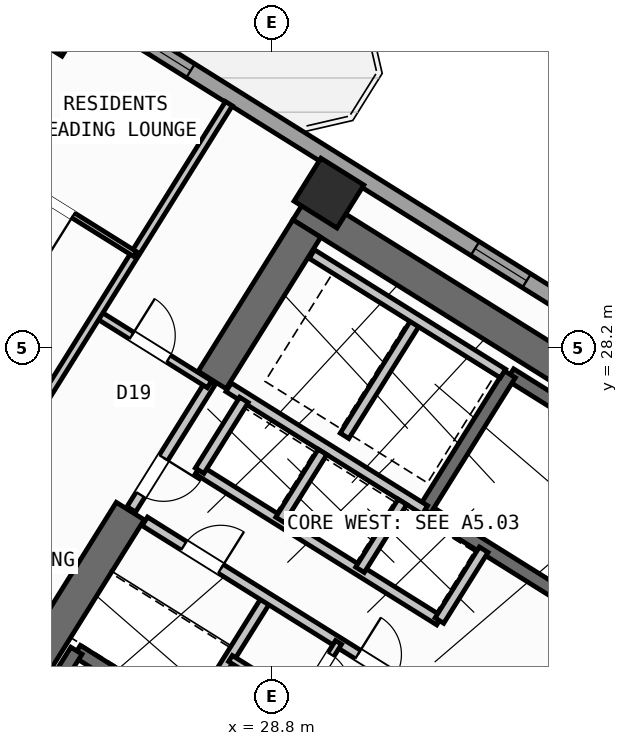
"""IFC4 building model, lengths in metres.
Left out: names, types, materials, properties, quantities, classifications, styles, units other than length and angle.
Written with IfcOpenShell. Run it as: python <this file> out.ifc"""

import sys

from ifc_helpers import new_model, si_unit, direction, frame, frame_2d, origin, origin_2d, place, context, subcontext, project, spatial, rectangle, hollow_rectangle, extrude, source, transform, mapped, element, fill, save


model = new_model("IFC4")
c1 = context("Model", 3, precision=1e-05, world=origin(), true_north=direction((0.0, 1.0)))
c2 = subcontext(c1, "Body", "Model", "MODEL_VIEW")
j1 = project(units=[si_unit("LENGTHUNIT", "METRE"), si_unit("PLANEANGLEUNIT", "RADIAN")], contexts=[c1])
p1 = place(None, origin())
s1 = spatial("IfcSite", under=j1, at=p1, CompositionType="ELEMENT")
p2 = place(p1, origin())
s2 = spatial("IfcBuilding", under=s1, at=p2, CompositionType="ELEMENT")
p3 = place(p2, frame((0.0, 0.0, 52.8)))
s3 = spatial("IfcBuildingStorey", under=s2, at=p3, CompositionType="ELEMENT", Elevation=52.8)
p4 = place(p3, frame((40.615, 23.983, 0.0), z_axis=(0.0, 0.0, 1.0), x_axis=(-0.848045953968, 0.529922692436, 0.0)))
e1 = element("IfcWall", 1, at=p4, inside=s3, PredefinedType="SHEAR", context=c2, shape_type="SweptSolid", body=[
    extrude(rectangle(XDim=13.24, YDim=0.65, at=frame_2d((6.62, 0.0))), origin(), (0.0, 0.0, 1.0), 3.35),
])
p5 = place(p3, frame((29.491, 30.552, 0.0), z_axis=(0.0, 0.0, 1.0), x_axis=(-0.529893103397, -0.8480644427, 0.0)))
e2 = element("IfcWall", 2, at=p5, inside=s3, PredefinedType="SHEAR", context=c2, shape_type="SweptSolid", body=[
    extrude(rectangle(XDim=3.525, YDim=0.65, at=frame_2d((1.763, 0.0))), origin(), (0.0, 0.0, 1.0), 3.35),
])
p6 = place(p3, frame((26.007, 24.976, 0.0), z_axis=(0.0, 0.0, 1.0), x_axis=(-0.529916319127, -0.848049936456, 0.0)))
e3 = element("IfcWall", 3, at=p6, inside=s3, PredefinedType="SHEAR", context=c2, shape_type="SweptSolid", body=[
    extrude(rectangle(XDim=6.375, YDim=0.65, at=frame_2d((3.188, 0.0))), origin(), (0.0, 0.0, 1.0), 3.35),
])
m1 = source(origin(), c2, "Body", "SweptSolid", [
    extrude(hollow_rectangle(XDim=1.0, YDim=1.0, WallThickness=0.04, at=origin_2d()), origin(), (0.0, 0.0, 1.0), 3.6),
])
for number, where, z_axis, x_axis in (
    (4, (29.928, 31.251, 0.0), (0.0, 0.0, 1.0), (-0.848, 0.53, 0.0)),
    (5, (24.5, 34.643, 0.0), (0.0, 0.0, 1.0), (-0.848, 0.53, 0.0)),
):
    element("IfcColumn", number, at=place(p3, frame(where, z_axis=z_axis, x_axis=x_axis)), inside=s3, PredefinedType="COLUMN", context=c2, shape_type="MappedRepresentation", body=[
        mapped(m1, transform((0.0, 0.0, 0.0), scale=1.0)),
    ])
p7 = place(p3, frame((29.268, 6.429, 0.0), z_axis=(0.0, 0.0, 1.0), x_axis=(-0.848049971435, 0.529916263149, 0.0)))
e6 = element("IfcWall", 6, at=p7, inside=s3, PredefinedType="STANDARD", context=c2, shape_type="SweptSolid", body=[
    extrude(rectangle(XDim=31.588, YDim=0.32, at=frame_2d((15.794, 0.0))), origin(), (0.0, 0.0, 1.0), 3.35),
])
p8 = place(p7, frame((16.362, 0.0, 0.0)))
e7 = element("IfcOpeningElement", 7, at=p8, cuts=e6, PredefinedType="OPENING", context=c2, shape_type="SweptSolid", body=[
    extrude(rectangle(XDim=1.2, YDim=2.15, at=frame_2d((0.6, 1.075))), frame((0.0, 0.17, 0.0), z_axis=(0.0, -1.0, 0.0), x_axis=(1.0, 0.0, 0.0)), (0.0, 0.0, 1.0), 0.34),
])
p9 = place(p7, frame((2.989, 0.0, 0.8)))
e8 = element("IfcOpeningElement", 8, at=p9, cuts=e6, PredefinedType="OPENING", context=c2, shape_type="SweptSolid", body=[
    extrude(rectangle(XDim=2.1, YDim=1.55, at=frame_2d((1.05, 0.775))), frame((0.0, 0.17, 0.0), z_axis=(0.0, -1.0, 0.0), x_axis=(1.0, 0.0, 0.0)), (0.0, 0.0, 1.0), 0.34),
])
p10 = place(p7, frame((8.359, 0.0, 0.8)))
e9 = element("IfcOpeningElement", 9, at=p10, cuts=e6, PredefinedType="OPENING", context=c2, shape_type="SweptSolid", body=[
    extrude(rectangle(XDim=2.1, YDim=1.55, at=frame_2d((1.05, 0.775))), frame((0.0, 0.17, 0.0), z_axis=(0.0, -1.0, 0.0), x_axis=(1.0, 0.0, 0.0)), (0.0, 0.0, 1.0), 0.34),
])
p11 = place(p7, frame((13.284, 0.0, 0.95)))
e10 = element("IfcOpeningElement", 10, at=p11, cuts=e6, PredefinedType="OPENING", context=c2, shape_type="SweptSolid", body=[
    extrude(rectangle(XDim=1.2, YDim=1.4, at=frame_2d((0.6, 0.7))), frame((0.0, 0.17, 0.0), z_axis=(0.0, -1.0, 0.0), x_axis=(1.0, 0.0, 0.0)), (0.0, 0.0, 1.0), 0.34),
])
p12 = place(p7, frame((20.259, 0.0, 0.95)))
e11 = element("IfcOpeningElement", 11, at=p12, cuts=e6, PredefinedType="OPENING", context=c2, shape_type="SweptSolid", body=[
    extrude(rectangle(XDim=1.2, YDim=1.4, at=frame_2d((0.6, 0.7))), frame((0.0, 0.17, 0.0), z_axis=(0.0, -1.0, 0.0), x_axis=(1.0, 0.0, 0.0)), (0.0, 0.0, 1.0), 0.34),
])
p13 = place(p7, frame((22.929, 0.0, 0.95)))
e12 = element("IfcOpeningElement", 12, at=p13, cuts=e6, PredefinedType="OPENING", context=c2, shape_type="SweptSolid", body=[
    extrude(rectangle(XDim=1.2, YDim=1.4, at=frame_2d((0.6, 0.7))), frame((0.0, 0.17, 0.0), z_axis=(0.0, -1.0, 0.0), x_axis=(1.0, 0.0, 0.0)), (0.0, 0.0, 1.0), 0.34),
])
p14 = place(p7, frame((26.106, 0.0, 0.85)))
e13 = element("IfcOpeningElement", 13, at=p14, cuts=e6, PredefinedType="OPENING", context=c2, shape_type="SweptSolid", body=[
    extrude(rectangle(XDim=1.5, YDim=1.5, at=frame_2d((0.75, 0.75))), frame((0.0, 0.17, 0.0), z_axis=(0.0, -1.0, 0.0), x_axis=(1.0, 0.0, 0.0)), (0.0, 0.0, 1.0), 0.34),
])
p15 = place(p7, frame((29.068, 0.0, 0.85)))
e14 = element("IfcOpeningElement", 14, at=p15, cuts=e6, PredefinedType="OPENING", context=c2, shape_type="SweptSolid", body=[
    extrude(rectangle(XDim=1.8, YDim=1.5, at=frame_2d((0.9, 0.75))), frame((0.0, 0.17, 0.0), z_axis=(0.0, -1.0, 0.0), x_axis=(1.0, 0.0, 0.0)), (0.0, 0.0, 1.0), 0.34),
])
p16 = place(p3, frame((14.138, 41.825, 0.0), z_axis=(0.0, 0.0, 1.0), x_axis=(0.848046498049, -0.529921821731, 0.0)))
e15 = element("IfcWall", 15, at=p16, inside=s3, PredefinedType="STANDARD", context=c2, shape_type="SweptSolid", body=[
    extrude(rectangle(XDim=31.588, YDim=0.32, at=frame_2d((15.794, 0.0))), origin(), (0.0, 0.0, 1.0), 3.35),
])
p17 = place(p16, frame((3.159, 0.0, 0.0)))
e16 = element("IfcOpeningElement", 16, at=p17, cuts=e15, PredefinedType="OPENING", context=c2, shape_type="SweptSolid", body=[
    extrude(rectangle(XDim=1.05, YDim=2.15, at=frame_2d((0.525, 1.075))), frame((0.0, 0.17, 0.0), z_axis=(0.0, -1.0, 0.0), x_axis=(1.0, 0.0, 0.0)), (0.0, 0.0, 1.0), 0.34),
])
p18 = place(p16, frame((0.906, 0.0, 1.0)))
e17 = element("IfcOpeningElement", 17, at=p18, cuts=e15, PredefinedType="OPENING", context=c2, shape_type="SweptSolid", body=[
    extrude(rectangle(XDim=0.9, YDim=1.25, at=frame_2d((0.45, 0.625))), frame((0.0, 0.17, 0.0), z_axis=(0.0, -1.0, 0.0), x_axis=(1.0, 0.0, 0.0)), (0.0, 0.0, 1.0), 0.34),
])
p19 = place(p16, frame((9.537, 0.0, 0.85)))
e18 = element("IfcOpeningElement", 18, at=p19, cuts=e15, PredefinedType="OPENING", context=c2, shape_type="SweptSolid", body=[
    extrude(rectangle(XDim=1.8, YDim=1.5, at=frame_2d((0.9, 0.75))), frame((0.0, 0.17, 0.0), z_axis=(0.0, -1.0, 0.0), x_axis=(1.0, 0.0, 0.0)), (0.0, 0.0, 1.0), 0.34),
])
p20 = place(p16, frame((13.899, 0.0, 0.85)))
e19 = element("IfcOpeningElement", 19, at=p20, cuts=e15, PredefinedType="OPENING", context=c2, shape_type="SweptSolid", body=[
    extrude(rectangle(XDim=1.5, YDim=1.5, at=frame_2d((0.75, 0.75))), frame((0.0, 0.17, 0.0), z_axis=(0.0, -1.0, 0.0), x_axis=(1.0, 0.0, 0.0)), (0.0, 0.0, 1.0), 0.34),
])
p21 = place(p16, frame((22.019, 0.0, 0.95)))
e20 = element("IfcOpeningElement", 20, at=p21, cuts=e15, PredefinedType="OPENING", context=c2, shape_type="SweptSolid", body=[
    extrude(rectangle(XDim=1.2, YDim=1.4, at=frame_2d((0.6, 0.7))), frame((0.0, 0.17, 0.0), z_axis=(0.0, -1.0, 0.0), x_axis=(1.0, 0.0, 0.0)), (0.0, 0.0, 1.0), 0.34),
])
p22 = place(p16, frame((27.569, 0.0, 0.95)))
e21 = element("IfcOpeningElement", 21, at=p22, cuts=e15, PredefinedType="OPENING", context=c2, shape_type="SweptSolid", body=[
    extrude(rectangle(XDim=1.2, YDim=1.4, at=frame_2d((0.6, 0.7))), frame((0.0, 0.17, 0.0), z_axis=(0.0, -1.0, 0.0), x_axis=(1.0, 0.0, 0.0)), (0.0, 0.0, 1.0), 0.34),
])
p23 = place(p3, frame((31.28, 18.261, 0.0), z_axis=(0.0, 0.0, 1.0), x_axis=(-0.848051618787, 0.529913626805, 0.0)))
e22 = element("IfcWall", 22, at=p23, inside=s3, PredefinedType="SHEAR", context=c2, shape_type="SweptSolid", body=[
    extrude(rectangle(XDim=7.46, YDim=0.26, at=frame_2d((3.73, 0.0))), origin(), (0.0, 0.0, 1.0), 3.35),
])
p24 = place(p23, frame((0.36, 0.0, 0.0)))
e23 = element("IfcOpeningElement", 23, at=p24, cuts=e22, PredefinedType="OPENING", context=c2, shape_type="SweptSolid", body=[
    extrude(rectangle(XDim=0.86, YDim=2.05, at=frame_2d((0.43, 1.025))), frame((0.0, 0.14, 0.0), z_axis=(0.0, -1.0, 0.0), x_axis=(1.0, 0.0, 0.0)), (0.0, 0.0, 1.0), 0.28),
])
p25 = place(p3, frame((24.945, 22.22, 0.0), z_axis=(0.0, 0.0, 1.0), x_axis=(-0.529908658664, -0.84805472316, 0.0)))
e24 = element("IfcWall", 24, at=p25, inside=s3, PredefinedType="SHEAR", context=c2, shape_type="SweptSolid", body=[
    extrude(rectangle(XDim=3.16, YDim=0.26, at=frame_2d((1.58, 0.0))), origin(), (0.0, 0.0, 1.0), 3.35),
])
p26 = place(p3, frame((39.721, 23.788, 0.0), z_axis=(0.0, 0.0, 1.0), x_axis=(-0.848054434086, 0.529909121291, 0.0)))
e25 = element("IfcWall", 25, at=p26, inside=s3, PredefinedType="SHEAR", context=c2, shape_type="SweptSolid", body=[
    extrude(rectangle(XDim=7.33, YDim=0.26, at=frame_2d((3.665, 0.0))), origin(), (0.0, 0.0, 1.0), 3.35),
])
p27 = place(p3, frame((38.046, 21.108, 0.0), z_axis=(0.0, 0.0, 1.0), x_axis=(-0.848054434086, 0.529909121291, 0.0)))
e26 = element("IfcWall", 26, at=p27, inside=s3, PredefinedType="SHEAR", context=c2, shape_type="SweptSolid", body=[
    extrude(rectangle(XDim=7.33, YDim=0.26, at=frame_2d((3.665, 0.0))), origin(), (0.0, 0.0, 1.0), 3.35),
])
p28 = place(p27, frame((0.22, 0.0, 0.0)))
e27 = element("IfcOpeningElement", 27, at=p28, cuts=e26, PredefinedType="OPENING", context=c2, shape_type="SweptSolid", body=[
    extrude(rectangle(XDim=1.1, YDim=2.1, at=frame_2d((0.55, 1.05))), frame((0.0, 0.14, 0.0), z_axis=(0.0, -1.0, 0.0), x_axis=(1.0, 0.0, 0.0)), (0.0, 0.0, 1.0), 0.28),
])
p29 = place(p3, frame((33.496, 27.677, 0.0), z_axis=(0.0, 0.0, 1.0), x_axis=(-0.529908658664, -0.84805472316, 0.0)))
e28 = element("IfcWall", 28, at=p29, inside=s3, PredefinedType="SHEAR", context=c2, shape_type="SweptSolid", body=[
    extrude(rectangle(XDim=3.16, YDim=0.26, at=frame_2d((1.58, 0.0))), origin(), (0.0, 0.0, 1.0), 3.35),
])
p30 = place(p3, frame((31.822, 24.998, 0.0), z_axis=(0.0, 0.0, 1.0), x_axis=(-0.848058348634, 0.529902856485, 0.0)))
e29 = element("IfcWall", 29, at=p30, inside=s3, PredefinedType="STANDARD", context=c2, shape_type="SweptSolid", body=[
    extrude(rectangle(XDim=4.568, YDim=0.2, at=frame_2d((2.284, 0.0))), origin(), (0.0, 0.0, 1.0), 3.34),
])
p31 = place(p3, frame((32.108, 22.814, 0.0), z_axis=(0.0, 0.0, 1.0), x_axis=(-0.848042229521, 0.529928652696, 0.0)))
e30 = element("IfcWall", 30, at=p31, inside=s3, PredefinedType="STANDARD", context=c2, shape_type="SweptSolid", body=[
    extrude(rectangle(XDim=5.62, YDim=0.2, at=frame_2d((2.81, 0.0))), origin(), (0.0, 0.0, 1.0), 3.34),
])
p32 = place(p3, frame((32.982, 24.213, 0.0), z_axis=(0.0, 0.0, 1.0), x_axis=(-0.529839334948, -0.84809803628, 0.0)))
e31 = element("IfcWall", 31, at=p32, inside=s3, PredefinedType="STANDARD", context=c2, shape_type="SweptSolid", body=[
    extrude(rectangle(XDim=1.65, YDim=0.2, at=frame_2d((0.825, 0.0))), origin(), (0.0, 0.0, 1.0), 3.34),
])
p33 = place(p3, frame((28.25, 27.17, 0.0), z_axis=(0.0, 0.0, 1.0), x_axis=(-0.529905827651, -0.848056492117, 0.0)))
e32 = element("IfcWall", 32, at=p33, inside=s3, PredefinedType="STANDARD", context=c2, shape_type="SweptSolid", body=[
    extrude(rectangle(XDim=1.65, YDim=0.2, at=frame_2d((0.825, 0.0))), origin(), (0.0, 0.0, 1.0), 3.34),
])
p34 = place(p3, frame((31.645, 28.716, 0.0), z_axis=(0.0, 0.0, 1.0), x_axis=(-0.52986693015, -0.848080795876, 0.0)))
e33 = element("IfcWall", 33, at=p34, inside=s3, PredefinedType="STANDARD", context=c2, shape_type="SweptSolid", body=[
    extrude(rectangle(XDim=2.66, YDim=0.2, at=frame_2d((1.33, 0.0))), origin(), (0.0, 0.0, 1.0), 3.34),
])
p35 = place(p3, frame((33.363, 27.69, 0.0), z_axis=(0.0, 0.0, 1.0), x_axis=(-0.848053806312, 0.529910125964, 0.0)))
e34 = element("IfcWall", 34, at=p35, inside=s3, PredefinedType="STANDARD", context=c2, shape_type="SweptSolid", body=[
    extrude(rectangle(XDim=4.448, YDim=0.2, at=frame_2d((2.224, 0.0))), origin(), (0.0, 0.0, 1.0), 3.34),
])
for number, where, z_axis, x_axis in (
    (35, (31.379, 25.156, 0.0), (0.0, 0.0, 1.0), (-0.53, -0.848, 0.0)),
    (36, (29.801, 26.142, 0.0), (0.0, 0.0, 1.0), (-0.53, -0.848, 0.0)),
):
    element("IfcWall", number, at=place(p3, frame(where, z_axis=z_axis, x_axis=x_axis)), inside=s3, PredefinedType="STANDARD", context=c2, shape_type="SweptSolid", body=[
        extrude(rectangle(XDim=1.58, YDim=0.2, at=frame_2d((0.79, 0.0))), origin(), (0.0, 0.0, 1.0), 3.34),
    ])
p36 = place(p3, frame((28.71, 23.263, 0.0), z_axis=(0.0, 0.0, 1.0), x_axis=(-0.529907497854, -0.848055448493, 0.0)))
e37 = element("IfcWall", 37, at=p36, inside=s3, PredefinedType="STANDARD", context=c2, shape_type="SweptSolid", body=[
    extrude(rectangle(XDim=2.88, YDim=0.2, at=frame_2d((1.44, 0.0))), origin(), (0.0, 0.0, 1.0), 3.34),
])
p37 = place(p3, frame((31.525, 21.504, 0.0), z_axis=(0.0, 0.0, 1.0), x_axis=(-0.848044998614, 0.529924221305, 0.0)))
e38 = element("IfcWall", 38, at=p37, inside=s3, PredefinedType="STANDARD", context=c2, shape_type="SweptSolid", body=[
    extrude(rectangle(XDim=6.168, YDim=0.2, at=frame_2d((3.084, 0.0))), origin(), (0.0, 0.0, 1.0), 3.34),
])
p38 = place(p37, frame((4.4, 0.0, 0.0)))
e39 = element("IfcOpeningElement", 39, at=p38, cuts=e38, PredefinedType="OPENING", context=c2, shape_type="SweptSolid", body=[
    extrude(rectangle(XDim=0.86, YDim=2.05, at=frame_2d((0.43, 1.025))), frame((0.0, 0.11, 0.0), z_axis=(0.0, -1.0, 0.0), x_axis=(1.0, 0.0, 0.0)), (0.0, 0.0, 1.0), 0.22),
])
p39 = place(p37, frame((0.35, 0.0, 0.0)))
e40 = element("IfcOpeningElement", 40, at=p39, cuts=e38, PredefinedType="OPENING", context=c2, shape_type="SweptSolid", body=[
    extrude(rectangle(XDim=0.86, YDim=2.05, at=frame_2d((0.43, 1.025))), frame((0.0, 0.11, 0.0), z_axis=(0.0, -1.0, 0.0), x_axis=(1.0, 0.0, 0.0)), (0.0, 0.0, 1.0), 0.22),
])
p40 = place(p3, frame((30.117, 22.384, 0.0), z_axis=(0.0, 0.0, 1.0), x_axis=(-0.529951914384, -0.848027693204, 0.0)))
e41 = element("IfcWall", 41, at=p40, inside=s3, PredefinedType="PLUMBINGWALL", context=c2, shape_type="SweptSolid", body=[
    extrude(rectangle(XDim=1.4, YDim=0.14, at=frame_2d((0.7, 0.0))), origin(), (0.0, 0.0, 1.0), 3.34),
])
p41 = place(p40, frame((0.28, 0.0, 0.0)))
e42 = element("IfcOpeningElement", 42, at=p41, cuts=e41, PredefinedType="OPENING", context=c2, shape_type="SweptSolid", body=[
    extrude(rectangle(XDim=0.78, YDim=2.05, at=frame_2d((0.39, 1.025))), frame((0.0, 0.08, 0.0), z_axis=(0.0, -1.0, 0.0), x_axis=(1.0, 0.0, 0.0)), (0.0, 0.0, 1.0), 0.16),
])
p42 = place(p3, frame((30.766, 20.327, 0.0), z_axis=(0.0, 0.0, 1.0), x_axis=(-0.848052663127, 0.529911955482, 0.0)))
e43 = element("IfcWall", 43, at=p42, inside=s3, PredefinedType="PLUMBINGWALL", context=c2, shape_type="SweptSolid", body=[
    extrude(rectangle(XDim=3.28, YDim=0.14, at=frame_2d((1.64, 0.0))), origin(), (0.0, 0.0, 1.0), 3.34),
])
p43 = place(p42, frame((0.25, 0.0, 0.0)))
e44 = element("IfcOpeningElement", 44, at=p43, cuts=e43, PredefinedType="OPENING", context=c2, shape_type="SweptSolid", body=[
    extrude(rectangle(XDim=0.78, YDim=2.05, at=frame_2d((0.39, 1.025))), frame((0.0, 0.08, 0.0), z_axis=(0.0, -1.0, 0.0), x_axis=(1.0, 0.0, 0.0)), (0.0, 0.0, 1.0), 0.16),
])
p44 = place(p42, frame((1.92, 0.0, 0.0)))
e45 = element("IfcOpeningElement", 45, at=p44, cuts=e43, PredefinedType="OPENING", context=c2, shape_type="SweptSolid", body=[
    extrude(rectangle(XDim=0.78, YDim=2.05, at=frame_2d((0.39, 1.025))), frame((0.0, 0.08, 0.0), z_axis=(0.0, -1.0, 0.0), x_axis=(1.0, 0.0, 0.0)), (0.0, 0.0, 1.0), 0.16),
])
p45 = place(p3, frame((27.596, 27.52, 0.0), z_axis=(0.0, 0.0, 1.0), x_axis=(-0.529865479138, -0.848081702443, 0.0)))
e46 = element("IfcWall", 46, at=p45, inside=s3, PredefinedType="STANDARD", context=c2, shape_type="SweptSolid", body=[
    extrude(rectangle(XDim=2.96, YDim=0.2, at=frame_2d((1.48, 0.0))), origin(), (0.0, 0.0, 1.0), 3.34),
])
p46 = place(p45, frame((1.76, 0.0, 0.0)))
e47 = element("IfcOpeningElement", 47, at=p46, cuts=e46, PredefinedType="OPENING", context=c2, shape_type="SweptSolid", body=[
    extrude(rectangle(XDim=0.86, YDim=2.05, at=frame_2d((0.43, 1.025))), frame((0.0, 0.11, 0.0), z_axis=(0.0, -1.0, 0.0), x_axis=(1.0, 0.0, 0.0)), (0.0, 0.0, 1.0), 0.22),
])
p47 = place(p3, frame((27.57, 27.478, 0.0), z_axis=(0.0, 0.0, 1.0), x_axis=(-0.848050851465, 0.529914854792, 0.0)))
e48 = element("IfcWall", 48, at=p47, inside=s3, PredefinedType="PARTITIONING", context=c2, shape_type="SweptSolid", body=[
    extrude(rectangle(XDim=2.61, YDim=0.16, at=frame_2d((1.305, 0.0))), origin(), (0.0, 0.0, 1.0), 3.34),
])
p48 = place(p47, frame((0.95, 0.0, 0.0)))
e49 = element("IfcOpeningElement", 49, at=p48, cuts=e48, PredefinedType="OPENING", context=c2, shape_type="SweptSolid", body=[
    extrude(rectangle(XDim=0.86, YDim=2.05, at=frame_2d((0.43, 1.025))), frame((0.0, 0.09, 0.0), z_axis=(0.0, -1.0, 0.0), x_axis=(1.0, 0.0, 0.0)), (0.0, 0.0, 1.0), 0.18),
])
p49 = place(p3, frame((27.953, 33.016, 0.0), z_axis=(0.0, 0.0, 1.0), x_axis=(-0.529903001606, -0.848058257957, 0.0)))
e50 = element("IfcWall", 50, at=p49, inside=s3, PredefinedType="PARTITIONING", context=c2, shape_type="SweptSolid", body=[
    extrude(rectangle(XDim=9.15, YDim=0.16, at=frame_2d((4.575, 0.0))), origin(), (0.0, 0.0, 1.0), 3.34),
])
p50 = place(p3, frame((26.099, 30.05, 0.0), z_axis=(0.0, 0.0, 1.0), x_axis=(-0.84803087207, 0.529946827537, 0.0)))
e51 = element("IfcWall", 51, at=p50, inside=s3, PredefinedType="PARTITIONING", context=c2, shape_type="SweptSolid", body=[
    extrude(rectangle(XDim=3.79, YDim=0.11, at=frame_2d((1.895, 0.0))), origin(), (0.0, 0.0, 1.0), 3.34),
])
p51 = place(p50, frame((1.435, 0.0, 0.0)))
e52 = element("IfcOpeningElement", 52, at=p51, cuts=e51, PredefinedType="OPENING", context=c2, shape_type="SweptSolid", body=[
    extrude(rectangle(XDim=0.92, YDim=2.08, at=frame_2d((0.46, 1.04))), frame((0.0, 0.065, 0.0), z_axis=(0.0, -1.0, 0.0), x_axis=(1.0, 0.0, 0.0)), (0.0, 0.0, 1.0), 0.13),
])
m2 = source(origin(), c2, "Body", "SweptSolid", [
    extrude(rectangle(XDim=1.5, YDim=1.5, at=frame_2d((0.75, 0.75))), frame((0.0, 0.03, 0.0), z_axis=(0.0, -1.0, 0.0), x_axis=(1.0, 0.0, 0.0)), (0.0, 0.0, 1.0), 0.06),
])
p52 = place(p20, origin())
e53 = element("IfcWindow", 53, at=p52, inside=s3, PartitioningType="SINGLE_PANEL", PredefinedType="WINDOW", context=c2, shape_type="MappedRepresentation", body=[
    mapped(m2, transform((0.0, 0.0, 0.0), scale=1.0)),
])
fill(e19, e53)
m3 = source(origin(), c2, "Body", "SweptSolid", [
    extrude(rectangle(XDim=1.2, YDim=1.4, at=frame_2d((0.6, 0.7))), frame((0.0, 0.03, 0.0), z_axis=(0.0, -1.0, 0.0), x_axis=(1.0, 0.0, 0.0)), (0.0, 0.0, 1.0), 0.06),
])
p53 = place(p21, origin())
e54 = element("IfcWindow", 54, at=p53, inside=s3, PartitioningType="SINGLE_PANEL", PredefinedType="WINDOW", context=c2, shape_type="MappedRepresentation", body=[
    mapped(m3, transform((0.0, 0.0, 0.0), scale=1.0)),
])
fill(e20, e54)
m4 = source(origin(), c2, "Body", "SweptSolid", [
    extrude(rectangle(XDim=0.86, YDim=2.05, at=frame_2d((0.43, 1.025))), frame((0.0, 0.025, 0.0), z_axis=(0.0, -1.0, 0.0), x_axis=(1.0, 0.0, 0.0)), (0.0, 0.0, 1.0), 0.05),
])
p54 = place(p38, frame((0.86, 0.0, 0.0), z_axis=(0.0, 0.0, 1.0), x_axis=(-1.0, 0.0, 0.0)))
e55 = element("IfcDoor", 55, at=p54, inside=s3, OperationType="SINGLE_SWING_RIGHT", PredefinedType="DOOR", context=c2, shape_type="MappedRepresentation", body=[
    mapped(m4, transform((0.0, 0.0, 0.0), scale=1.0)),
])
fill(e39, e55)
p55 = place(p39, frame((0.86, 0.0, 0.0), z_axis=(0.0, 0.0, 1.0), x_axis=(-1.0, 0.0, 0.0)))
e56 = element("IfcDoor", 56, at=p55, inside=s3, OperationType="SINGLE_SWING_LEFT", PredefinedType="DOOR", context=c2, shape_type="MappedRepresentation", body=[
    mapped(m4, transform((0.0, 0.0, 0.0), scale=1.0)),
])
fill(e40, e56)
m5 = source(origin(), c2, "Body", "SweptSolid", [
    extrude(rectangle(XDim=0.78, YDim=2.05, at=frame_2d((0.39, 1.025))), frame((0.0, 0.025, 0.0), z_axis=(0.0, -1.0, 0.0), x_axis=(1.0, 0.0, 0.0)), (0.0, 0.0, 1.0), 0.05),
])
p56 = place(p41, origin())
e57 = element("IfcDoor", 57, at=p56, inside=s3, OperationType="SINGLE_SWING_RIGHT", PredefinedType="DOOR", context=c2, shape_type="MappedRepresentation", body=[
    mapped(m5, transform((0.0, 0.0, 0.0), scale=1.0)),
])
fill(e42, e57)
p57 = place(p48, frame((0.86, 0.0, 0.0), z_axis=(0.0, 0.0, 1.0), x_axis=(-1.0, 0.0, 0.0)))
e58 = element("IfcDoor", 58, at=p57, inside=s3, OperationType="SINGLE_SWING_LEFT", PredefinedType="DOOR", context=c2, shape_type="MappedRepresentation", body=[
    mapped(m4, transform((0.0, 0.0, 0.0), scale=1.0)),
])
fill(e49, e58)
p58 = place(p46, origin())
e59 = element("IfcDoor", 59, at=p58, inside=s3, OperationType="SINGLE_SWING_LEFT", PredefinedType="DOOR", context=c2, shape_type="MappedRepresentation", body=[
    mapped(m4, transform((0.0, 0.0, 0.0), scale=1.0)),
])
fill(e47, e59)
m6 = source(origin(), c2, "Body", "SweptSolid", [
    extrude(rectangle(XDim=0.92, YDim=2.08, at=frame_2d((0.46, 1.04))), frame((0.0, 0.025, 0.0), z_axis=(0.0, -1.0, 0.0), x_axis=(1.0, 0.0, 0.0)), (0.0, 0.0, 1.0), 0.05),
])
p59 = place(p51, origin())
e60 = element("IfcDoor", 60, at=p59, inside=s3, OperationType="SINGLE_SWING_LEFT", PredefinedType="DOOR", context=c2, shape_type="MappedRepresentation", body=[
    mapped(m6, transform((0.0, 0.0, 0.0), scale=1.0)),
])
fill(e52, e60)
save(model, sys.argv[1])
